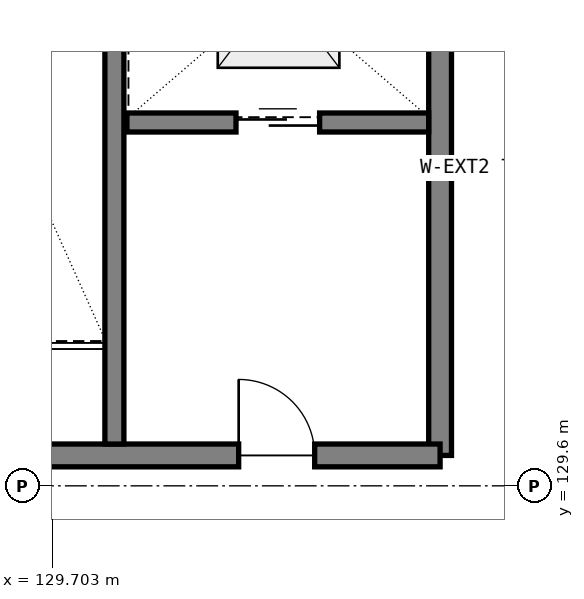
"""IFC4 building model, lengths in metres.
Left out: names, types, materials, properties, quantities, classifications, styles, units other than length and angle.
Written with IfcOpenShell. Run it as: python <this file> out.ifc"""

import sys

from ifc_helpers import new_model, si_unit, direction, frame, frame_2d, origin, place, context, subcontext, project, spatial, rectangle, extrude, element, fill, save


model = new_model("IFC4")
c1 = context("Model", 3, precision=1e-05, world=origin(), true_north=direction((0.0, 1.0)))
c2 = subcontext(c1, "Body", "Model", "MODEL_VIEW")
j1 = project(units=[si_unit("LENGTHUNIT", "METRE"), si_unit("PLANEANGLEUNIT", "RADIAN")], contexts=[c1])
p1 = place(None, origin())
s1 = spatial("IfcSite", under=j1, at=p1, CompositionType="ELEMENT")
p2 = place(p1, origin())
s2 = spatial("IfcBuilding", under=s1, at=p2, CompositionType="ELEMENT")
p3 = place(p2, frame((0.0, 0.0, 15.3)))
s3 = spatial("IfcBuildingStorey", under=s2, at=p3, CompositionType="ELEMENT", Elevation=15.3)
p4 = place(p3, frame((134.8, 130.0, 0.0), z_axis=(0.0, 0.0, 1.0), x_axis=(0.0, 1.0, 0.0)))
e1 = element("IfcWall", 1, at=p4, inside=s3, PredefinedType="SHEAR", context=c2, shape_type="SweptSolid", body=[
    extrude(rectangle(XDim=8.0, YDim=0.3, at=frame_2d((4.0, 0.0), x_axis=(1.0, 0.0))), origin(), (0.0, 0.0, 1.0), 3.09),
])
p5 = place(p3, frame((127.4, 130.0, 0.0), z_axis=(0.0, 0.0, 1.0), x_axis=(1.0, 0.0, 0.0)))
e2 = element("IfcWall", 2, at=p5, inside=s3, PredefinedType="SHEAR", context=c2, shape_type="SweptSolid", body=[
    extrude(rectangle(XDim=7.4, YDim=0.3, at=frame_2d((3.7, 0.0), x_axis=(1.0, 0.0))), origin(), (0.0, 0.0, 1.0), 3.09),
])
p6 = place(p5, frame((1.1, 0.0, 0.0)))
e3 = element("IfcOpeningElement", 3, at=p6, cuts=e2, PredefinedType="OPENING", context=c2, shape_type="SweptSolid", body=[
    extrude(rectangle(XDim=1.0, YDim=2.15, at=frame_2d((0.5, 1.075), x_axis=(1.0, 0.0))), frame((0.0, 0.16, 0.0), z_axis=(0.0, -1.0, 0.0), x_axis=(1.0, 0.0, 0.0)), (0.0, 0.0, 1.0), 0.32),
])
p7 = place(p5, frame((4.75, 0.0, 0.0)))
e4 = element("IfcOpeningElement", 4, at=p7, cuts=e2, PredefinedType="OPENING", context=c2, shape_type="SweptSolid", body=[
    extrude(rectangle(XDim=1.0, YDim=2.15, at=frame_2d((0.5, 1.075), x_axis=(1.0, 0.0))), frame((0.0, 0.16, 0.0), z_axis=(0.0, -1.0, 0.0), x_axis=(1.0, 0.0, 0.0)), (0.0, 0.0, 1.0), 0.32),
])
p8 = place(p3, frame((130.515, 130.15, 0.0), z_axis=(0.0, 0.0, 1.0), x_axis=(0.0, 1.0, 0.0)))
e5 = element("IfcWall", 5, at=p8, inside=s3, PredefinedType="SHEAR", context=c2, shape_type="SweptSolid", body=[
    extrude(rectangle(XDim=7.7, YDim=0.25, at=frame_2d((3.85, 0.0), x_axis=(1.0, 0.0))), origin(), (0.0, 0.0, 1.0), 3.09),
])
p9 = place(p3, frame((130.68, 134.38, 0.0), z_axis=(0.0, 0.0, 1.0), x_axis=(1.0, 0.0, 0.0)))
e6 = element("IfcWall", 6, at=p9, inside=s3, PredefinedType="SHEAR", context=c2, shape_type="SweptSolid", body=[
    extrude(rectangle(XDim=3.97, YDim=0.25, at=frame_2d((1.985, 0.0), x_axis=(1.0, 0.0))), origin(), (0.0, 0.0, 1.0), 3.09),
])
p10 = place(p9, frame((1.435, 0.0, 0.0)))
e7 = element("IfcOpeningElement", 7, at=p10, cuts=e6, PredefinedType="OPENING", context=c2, shape_type="SweptSolid", body=[
    extrude(rectangle(XDim=1.1, YDim=2.15, at=frame_2d((0.55, 1.075), x_axis=(1.0, 0.0))), frame((0.0, 0.135, 0.0), z_axis=(0.0, -1.0, 0.0), x_axis=(1.0, 0.0, 0.0)), (0.0, 0.0, 1.0), 0.27),
])
p11 = place(p7, origin())
e8 = element("IfcDoor", 8, at=p11, inside=s3, OperationType="SINGLE_SWING_LEFT", PredefinedType="DOOR", context=c2, shape_type="SweptSolid", body=[
    extrude(rectangle(XDim=1.0, YDim=2.15, at=frame_2d((0.5, 1.075), x_axis=(1.0, 0.0))), frame((0.0, 0.025, 0.0), z_axis=(0.0, -1.0, 0.0), x_axis=(1.0, 0.0, 0.0)), (0.0, 0.0, 1.0), 0.05),
])
fill(e4, e8)
p12 = place(p10, origin())
e9 = element("IfcDoor", 9, at=p12, inside=s3, OperationType="SLIDING_TO_LEFT", PredefinedType="DOOR", context=c2, shape_type="SweptSolid", body=[
    extrude(rectangle(XDim=1.1, YDim=2.15, at=frame_2d((0.55, 1.075), x_axis=(1.0, 0.0))), frame((0.0, 0.025, 0.0), z_axis=(0.0, -1.0, 0.0), x_axis=(1.0, 0.0, 0.0)), (0.0, 0.0, 1.0), 0.05),
])
fill(e7, e9)
save(model, sys.argv[1])
